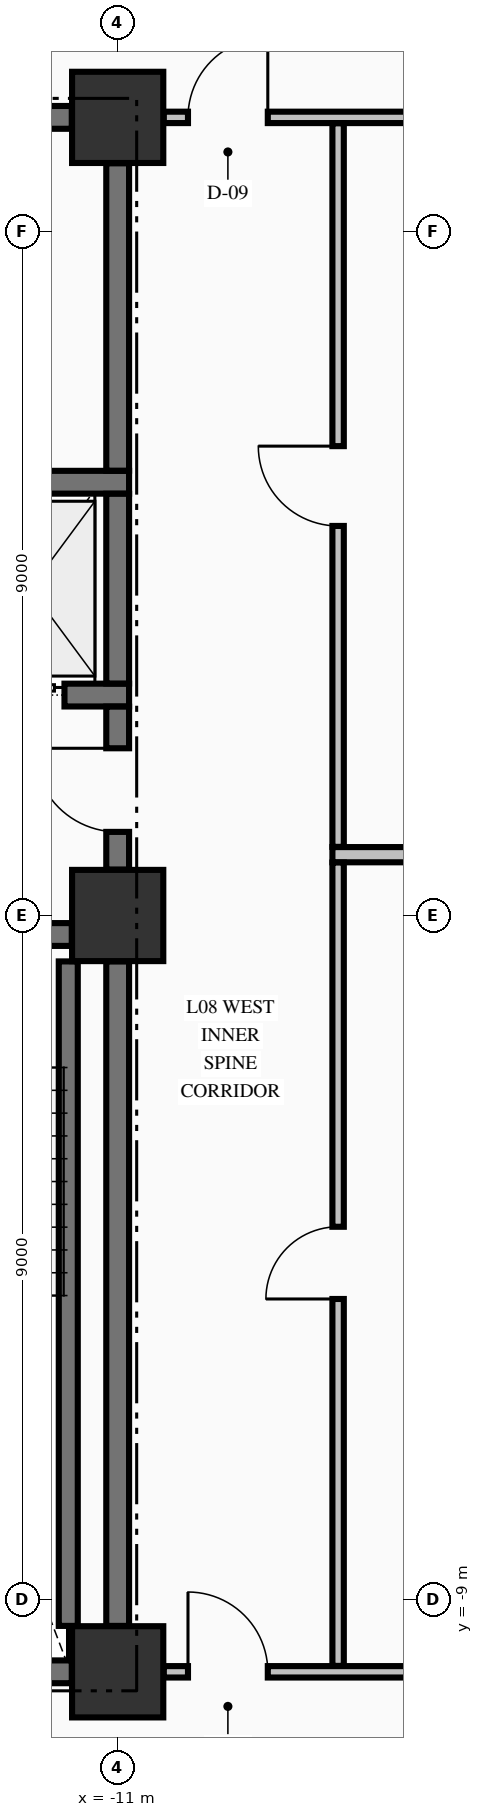
"""IFC4 building model, lengths in metres.
Left out: names, types, materials, properties, quantities, classifications, styles, units other than length and angle.
Written with IfcOpenShell. Run it as: python <this file> out.ifc"""

import sys

from ifc_helpers import new_model, si_unit, direction, frame, frame_2d, origin, origin_2d, place, context, subcontext, project, spatial, rectangle, extrude, element, fill, save


model = new_model("IFC4")
c1 = context("Model", 3, precision=1e-05, world=origin(), true_north=direction((0.0, 1.0)))
c2 = subcontext(c1, "Body", "Model", "MODEL_VIEW")
j1 = project(units=[si_unit("LENGTHUNIT", "METRE"), si_unit("PLANEANGLEUNIT", "RADIAN")], contexts=[c1])
p1 = place(None, origin())
s1 = spatial("IfcSite", under=j1, at=p1, CompositionType="ELEMENT")
p2 = place(p1, origin())
s2 = spatial("IfcBuilding", under=s1, at=p2, CompositionType="ELEMENT")
p3 = place(p2, frame((0.0, 0.0, 37.91)))
s3 = spatial("IfcBuildingStorey", under=s2, at=p3, CompositionType="ELEMENT", Elevation=37.91)
for number, where, z_axis, x_axis in (
    (1, (-11.0, -9.95, -0.25), (0.0, 0.0, 1.0), (1.0, 0.0, 0.0)),
    (2, (-11.0, 0.0, -0.25), (0.0, 0.0, 1.0), (1.0, 0.0, 0.0)),
    (3, (-11.0, 10.5, -0.25), (0.0, 0.0, 1.0), (1.0, 0.0, 0.0)),
):
    element("IfcColumn", number, at=place(p3, frame(where, z_axis=z_axis, x_axis=x_axis)), inside=s3, PredefinedType="COLUMN", context=c2, shape_type="SweptSolid", body=[
        extrude(rectangle(XDim=1.2, YDim=1.2, at=origin_2d()), origin(), (0.0, 0.0, 1.0), 3.57),
    ])
p4 = place(p3, frame((-14.7, -9.95, 0.0), z_axis=(0.0, 0.0, 1.0), x_axis=(1.0, 0.0, 0.0)))
e4 = element("IfcWall", 4, at=p4, inside=s3, PredefinedType="SHEAR", context=c2, shape_type="SweptSolid", body=[
    extrude(rectangle(XDim=3.096, YDim=0.3, at=frame_2d((1.548, 0.0))), origin(), (0.0, 0.0, 1.0), 3.32),
])
p5 = place(p3, frame((-19.396, -0.25, 0.0), z_axis=(0.0, 0.0, 1.0), x_axis=(1.0, 0.0, 0.0)))
e5 = element("IfcWall", 5, at=p5, inside=s3, PredefinedType="SHEAR", context=c2, shape_type="SweptSolid", body=[
    extrude(rectangle(XDim=7.792, YDim=0.3, at=frame_2d((3.896, 0.0))), origin(), (0.0, 0.0, 1.0), 3.32),
])
p6 = place(p5, frame((5.696, 0.0, 0.0)))
e6 = element("IfcOpeningElement", 6, at=p6, cuts=e5, PredefinedType="OPENING", context=c2, shape_type="SweptSolid", body=[
    extrude(rectangle(XDim=1.1, YDim=2.15, at=frame_2d((0.55, 1.075))), frame((0.0, 0.16, 0.0), z_axis=(0.0, -1.0, 0.0), x_axis=(1.0, 0.0, 0.0)), (0.0, 0.0, 1.0), 0.32),
])
p7 = place(p3, frame((-14.875, 2.9, 0.0), z_axis=(0.0, 0.0, 1.0), x_axis=(1.0, 0.0, 0.0)))
e7 = element("IfcWall", 7, at=p7, inside=s3, PredefinedType="SHEAR", context=c2, shape_type="SweptSolid", body=[
    extrude(rectangle(XDim=4.025, YDim=0.3, at=frame_2d((2.012, 0.0))), origin(), (0.0, 0.0, 1.0), 3.32),
])
p8 = place(p7, frame((2.075, 0.0, 0.0)))
e8 = element("IfcOpeningElement", 8, at=p8, cuts=e7, PredefinedType="OPENING", context=c2, shape_type="SweptSolid", body=[
    extrude(rectangle(XDim=1.1, YDim=2.2, at=frame_2d((0.55, 1.1))), frame((0.0, 0.16, 0.0), z_axis=(0.0, -1.0, 0.0), x_axis=(1.0, 0.0, 0.0)), (0.0, 0.0, 1.0), 0.32),
])
p9 = place(p3, frame((-14.875, 5.7, 0.0), z_axis=(0.0, 0.0, 1.0), x_axis=(1.0, 0.0, 0.0)))
e9 = element("IfcWall", 9, at=p9, inside=s3, PredefinedType="SHEAR", context=c2, shape_type="SweptSolid", body=[
    extrude(rectangle(XDim=4.025, YDim=0.3, at=frame_2d((2.012, 0.0))), origin(), (0.0, 0.0, 1.0), 3.32),
])
p10 = place(p3, frame((-14.7, 10.5, 0.0), z_axis=(0.0, 0.0, 1.0), x_axis=(1.0, 0.0, 0.0)))
e10 = element("IfcWall", 10, at=p10, inside=s3, PredefinedType="SHEAR", context=c2, shape_type="SweptSolid", body=[
    extrude(rectangle(XDim=3.096, YDim=0.3, at=frame_2d((1.548, 0.0))), origin(), (0.0, 0.0, 1.0), 3.32),
])
p11 = place(p10, frame((0.775, 0.0, 0.0)))
e11 = element("IfcOpeningElement", 11, at=p11, cuts=e10, PredefinedType="OPENING", context=c2, shape_type="SweptSolid", body=[
    extrude(rectangle(XDim=0.95, YDim=2.15, at=frame_2d((0.475, 1.075))), frame((0.0, 0.16, 0.0), z_axis=(0.0, -1.0, 0.0), x_axis=(1.0, 0.0, 0.0)), (0.0, 0.0, 1.0), 0.32),
])
p12 = place(p3, frame((-10.394, -9.95, 0.0), z_axis=(0.0, 0.0, 1.0), x_axis=(1.0, 0.0, 0.0)))
e12 = element("IfcWall", 12, at=p12, inside=s3, PredefinedType="PARTITIONING", context=c2, shape_type="SweptSolid", body=[
    extrude(rectangle(XDim=20.788, YDim=0.15, at=frame_2d((10.394, 0.0))), origin(), (0.0, 0.0, 1.0), 3.32),
])
p13 = place(p12, frame((0.319, 0.0, 0.0)))
e13 = element("IfcOpeningElement", 13, at=p13, cuts=e12, PredefinedType="OPENING", context=c2, shape_type="SweptSolid", body=[
    extrude(rectangle(XDim=1.05, YDim=2.15, at=frame_2d((0.525, 1.075))), frame((0.0, 0.085, 0.0), z_axis=(0.0, -1.0, 0.0), x_axis=(1.0, 0.0, 0.0)), (0.0, 0.0, 1.0), 0.17),
])
p14 = place(p12, frame((19.419, 0.0, 0.0)))
e14 = element("IfcOpeningElement", 14, at=p14, cuts=e12, PredefinedType="OPENING", context=c2, shape_type="SweptSolid", body=[
    extrude(rectangle(XDim=1.05, YDim=2.15, at=frame_2d((0.525, 1.075))), frame((0.0, 0.085, 0.0), z_axis=(0.0, -1.0, 0.0), x_axis=(1.0, 0.0, 0.0)), (0.0, 0.0, 1.0), 0.17),
])
p15 = place(p12, frame((11.569, 0.0, 0.0)))
e15 = element("IfcOpeningElement", 15, at=p15, cuts=e12, PredefinedType="OPENING", context=c2, shape_type="SweptSolid", body=[
    extrude(rectangle(XDim=0.95, YDim=2.15, at=frame_2d((0.475, 1.075))), frame((0.0, 0.085, 0.0), z_axis=(0.0, -1.0, 0.0), x_axis=(1.0, 0.0, 0.0)), (0.0, 0.0, 1.0), 0.17),
])
p16 = place(p3, frame((-8.175, 0.8, 0.0), z_axis=(0.0, 0.0, 1.0), x_axis=(1.0, 0.0, 0.0)))
e16 = element("IfcWall", 16, at=p16, inside=s3, PredefinedType="PARTITIONING", context=c2, shape_type="SweptSolid", body=[
    extrude(rectangle(XDim=6.475, YDim=0.2, at=frame_2d((3.238, 0.0))), origin(), (0.0, 0.0, 1.0), 3.32),
])
p17 = place(p3, frame((-10.394, 10.5, 0.0), z_axis=(0.0, 0.0, 1.0), x_axis=(1.0, 0.0, 0.0)))
e17 = element("IfcWall", 17, at=p17, inside=s3, PredefinedType="PARTITIONING", context=c2, shape_type="SweptSolid", body=[
    extrude(rectangle(XDim=20.788, YDim=0.15, at=frame_2d((10.394, 0.0))), origin(), (0.0, 0.0, 1.0), 3.32),
])
p18 = place(p17, frame((0.319, 0.0, 0.0)))
e18 = element("IfcOpeningElement", 18, at=p18, cuts=e17, PredefinedType="OPENING", context=c2, shape_type="SweptSolid", body=[
    extrude(rectangle(XDim=1.05, YDim=2.15, at=frame_2d((0.525, 1.075))), frame((0.0, 0.085, 0.0), z_axis=(0.0, -1.0, 0.0), x_axis=(1.0, 0.0, 0.0)), (0.0, 0.0, 1.0), 0.17),
])
p19 = place(p17, frame((19.419, 0.0, 0.0)))
e19 = element("IfcOpeningElement", 19, at=p19, cuts=e17, PredefinedType="OPENING", context=c2, shape_type="SweptSolid", body=[
    extrude(rectangle(XDim=1.05, YDim=2.15, at=frame_2d((0.525, 1.075))), frame((0.0, 0.085, 0.0), z_axis=(0.0, -1.0, 0.0), x_axis=(1.0, 0.0, 0.0)), (0.0, 0.0, 1.0), 0.17),
])
p20 = place(p3, frame((-11.65, -9.346, 0.0), z_axis=(0.0, 0.0, 1.0), x_axis=(0.0, 1.0, 0.0)))
e20 = element("IfcWall", 20, at=p20, inside=s3, PredefinedType="SOLIDWALL", context=c2, shape_type="SweptSolid", body=[
    extrude(rectangle(XDim=8.742, YDim=0.25, at=frame_2d((4.371, 0.0))), origin(), (0.0, 0.0, 1.0), 3.32),
])
p21 = place(p3, frame((-11.0, -9.346, 0.0), z_axis=(0.0, 0.0, 1.0), x_axis=(0.0, 1.0, 0.0)))
e21 = element("IfcWall", 21, at=p21, inside=s3, PredefinedType="SHEAR", context=c2, shape_type="SweptSolid", body=[
    extrude(rectangle(XDim=8.742, YDim=0.3, at=frame_2d((4.371, 0.0))), origin(), (0.0, 0.0, 1.0), 3.32),
])
p22 = place(p3, frame((-11.0, 0.604, 0.0), z_axis=(0.0, 0.0, 1.0), x_axis=(0.0, 1.0, 0.0)))
e22 = element("IfcWall", 22, at=p22, inside=s3, PredefinedType="SHEAR", context=c2, shape_type="SweptSolid", body=[
    extrude(rectangle(XDim=2.144, YDim=0.3, at=frame_2d((1.072, 0.0))), origin(), (0.0, 0.0, 1.0), 3.32),
])
p23 = place(p22, frame((0.496, 0.0, 0.0)))
e23 = element("IfcOpeningElement", 23, at=p23, cuts=e22, PredefinedType="OPENING", context=c2, shape_type="SweptSolid", body=[
    extrude(rectangle(XDim=1.1, YDim=2.15, at=frame_2d((0.55, 1.075))), frame((0.0, 0.16, 0.0), z_axis=(0.0, -1.0, 0.0), x_axis=(1.0, 0.0, 0.0)), (0.0, 0.0, 1.0), 0.32),
])
p24 = place(p3, frame((-11.0, 3.052, 0.0), z_axis=(0.0, 0.0, 1.0), x_axis=(0.0, 1.0, 0.0)))
e24 = element("IfcWall", 24, at=p24, inside=s3, PredefinedType="SHEAR", context=c2, shape_type="SweptSolid", body=[
    extrude(rectangle(XDim=2.496, YDim=0.3, at=frame_2d((1.248, 0.0))), origin(), (0.0, 0.0, 1.0), 3.32),
])
p25 = place(p3, frame((-11.0, 5.852, 0.0), z_axis=(0.0, 0.0, 1.0), x_axis=(0.0, 1.0, 0.0)))
e25 = element("IfcWall", 25, at=p25, inside=s3, PredefinedType="SHEAR", context=c2, shape_type="SweptSolid", body=[
    extrude(rectangle(XDim=4.044, YDim=0.3, at=frame_2d((2.022, 0.0))), origin(), (0.0, 0.0, 1.0), 3.32),
])
p26 = place(p3, frame((-8.1, -9.872, 0.0), z_axis=(0.0, 0.0, 1.0), x_axis=(0.0, 1.0, 0.0)))
e26 = element("IfcWall", 26, at=p26, inside=s3, PredefinedType="PARTITIONING", context=c2, shape_type="SweptSolid", body=[
    extrude(rectangle(XDim=10.569, YDim=0.15, at=frame_2d((5.285, 0.0))), origin(), (0.0, 0.0, 1.0), 3.32),
])
p27 = place(p26, frame((4.827, 0.0, 0.0)))
e27 = element("IfcOpeningElement", 27, at=p27, cuts=e26, PredefinedType="OPENING", context=c2, shape_type="SweptSolid", body=[
    extrude(rectangle(XDim=0.95, YDim=2.15, at=frame_2d((0.475, 1.075))), frame((0.0, 0.085, 0.0), z_axis=(0.0, -1.0, 0.0), x_axis=(1.0, 0.0, 0.0)), (0.0, 0.0, 1.0), 0.17),
])
p28 = place(p3, frame((-8.1, 0.903, 0.0), z_axis=(0.0, 0.0, 1.0), x_axis=(0.0, 1.0, 0.0)))
e28 = element("IfcWall", 28, at=p28, inside=s3, PredefinedType="PARTITIONING", context=c2, shape_type="SweptSolid", body=[
    extrude(rectangle(XDim=9.519, YDim=0.15, at=frame_2d((4.76, 0.0))), origin(), (0.0, 0.0, 1.0), 3.32),
])
p29 = place(p28, frame((4.222, 0.0, 0.0)))
e29 = element("IfcOpeningElement", 29, at=p29, cuts=e28, PredefinedType="OPENING", context=c2, shape_type="SweptSolid", body=[
    extrude(rectangle(XDim=1.05, YDim=2.15, at=frame_2d((0.525, 1.075))), frame((0.0, 0.085, 0.0), z_axis=(0.0, -1.0, 0.0), x_axis=(1.0, 0.0, 0.0)), (0.0, 0.0, 1.0), 0.17),
])
p30 = place(p23, origin())
e30 = element("IfcDoor", 30, at=p30, inside=s3, OperationType="SINGLE_SWING_RIGHT", PredefinedType="DOOR", context=c2, shape_type="SweptSolid", body=[
    extrude(rectangle(XDim=1.1, YDim=2.15, at=frame_2d((0.55, 1.075))), frame((0.0, 0.025, 0.0), z_axis=(0.0, -1.0, 0.0), x_axis=(1.0, 0.0, 0.0)), (0.0, 0.0, 1.0), 0.05),
])
fill(e23, e30)
p31 = place(p8, origin())
e31 = element("IfcDoor", 31, at=p31, inside=s3, OperationType="SLIDING_TO_LEFT", PredefinedType="DOOR", context=c2, shape_type="SweptSolid", body=[
    extrude(rectangle(XDim=1.1, YDim=2.2, at=frame_2d((0.55, 1.1))), frame((0.0, 0.025, 0.0), z_axis=(0.0, -1.0, 0.0), x_axis=(1.0, 0.0, 0.0)), (0.0, 0.0, 1.0), 0.05),
])
fill(e8, e31)
p32 = place(p18, origin())
e32 = element("IfcDoor", 32, at=p32, inside=s3, OperationType="SINGLE_SWING_RIGHT", PredefinedType="DOOR", context=c2, shape_type="SweptSolid", body=[
    extrude(rectangle(XDim=1.05, YDim=2.15, at=frame_2d((0.525, 1.075))), frame((0.0, 0.025, 0.0), z_axis=(0.0, -1.0, 0.0), x_axis=(1.0, 0.0, 0.0)), (0.0, 0.0, 1.0), 0.05),
])
fill(e18, e32)
p33 = place(p13, origin())
e33 = element("IfcDoor", 33, at=p33, inside=s3, OperationType="SINGLE_SWING_LEFT", PredefinedType="DOOR", context=c2, shape_type="SweptSolid", body=[
    extrude(rectangle(XDim=1.05, YDim=2.15, at=frame_2d((0.525, 1.075))), frame((0.0, 0.025, 0.0), z_axis=(0.0, -1.0, 0.0), x_axis=(1.0, 0.0, 0.0)), (0.0, 0.0, 1.0), 0.05),
])
fill(e13, e33)
p34 = place(p29, origin())
e34 = element("IfcDoor", 34, at=p34, inside=s3, OperationType="SINGLE_SWING_RIGHT", PredefinedType="DOOR", context=c2, shape_type="SweptSolid", body=[
    extrude(rectangle(XDim=1.05, YDim=2.15, at=frame_2d((0.525, 1.075))), frame((0.0, 0.025, 0.0), z_axis=(0.0, -1.0, 0.0), x_axis=(1.0, 0.0, 0.0)), (0.0, 0.0, 1.0), 0.05),
])
fill(e29, e34)
p35 = place(p27, origin())
e35 = element("IfcDoor", 35, at=p35, inside=s3, OperationType="SINGLE_SWING_LEFT", PredefinedType="DOOR", context=c2, shape_type="SweptSolid", body=[
    extrude(rectangle(XDim=0.95, YDim=2.15, at=frame_2d((0.475, 1.075))), frame((0.0, 0.025, 0.0), z_axis=(0.0, -1.0, 0.0), x_axis=(1.0, 0.0, 0.0)), (0.0, 0.0, 1.0), 0.05),
])
fill(e27, e35)
save(model, sys.argv[1])
